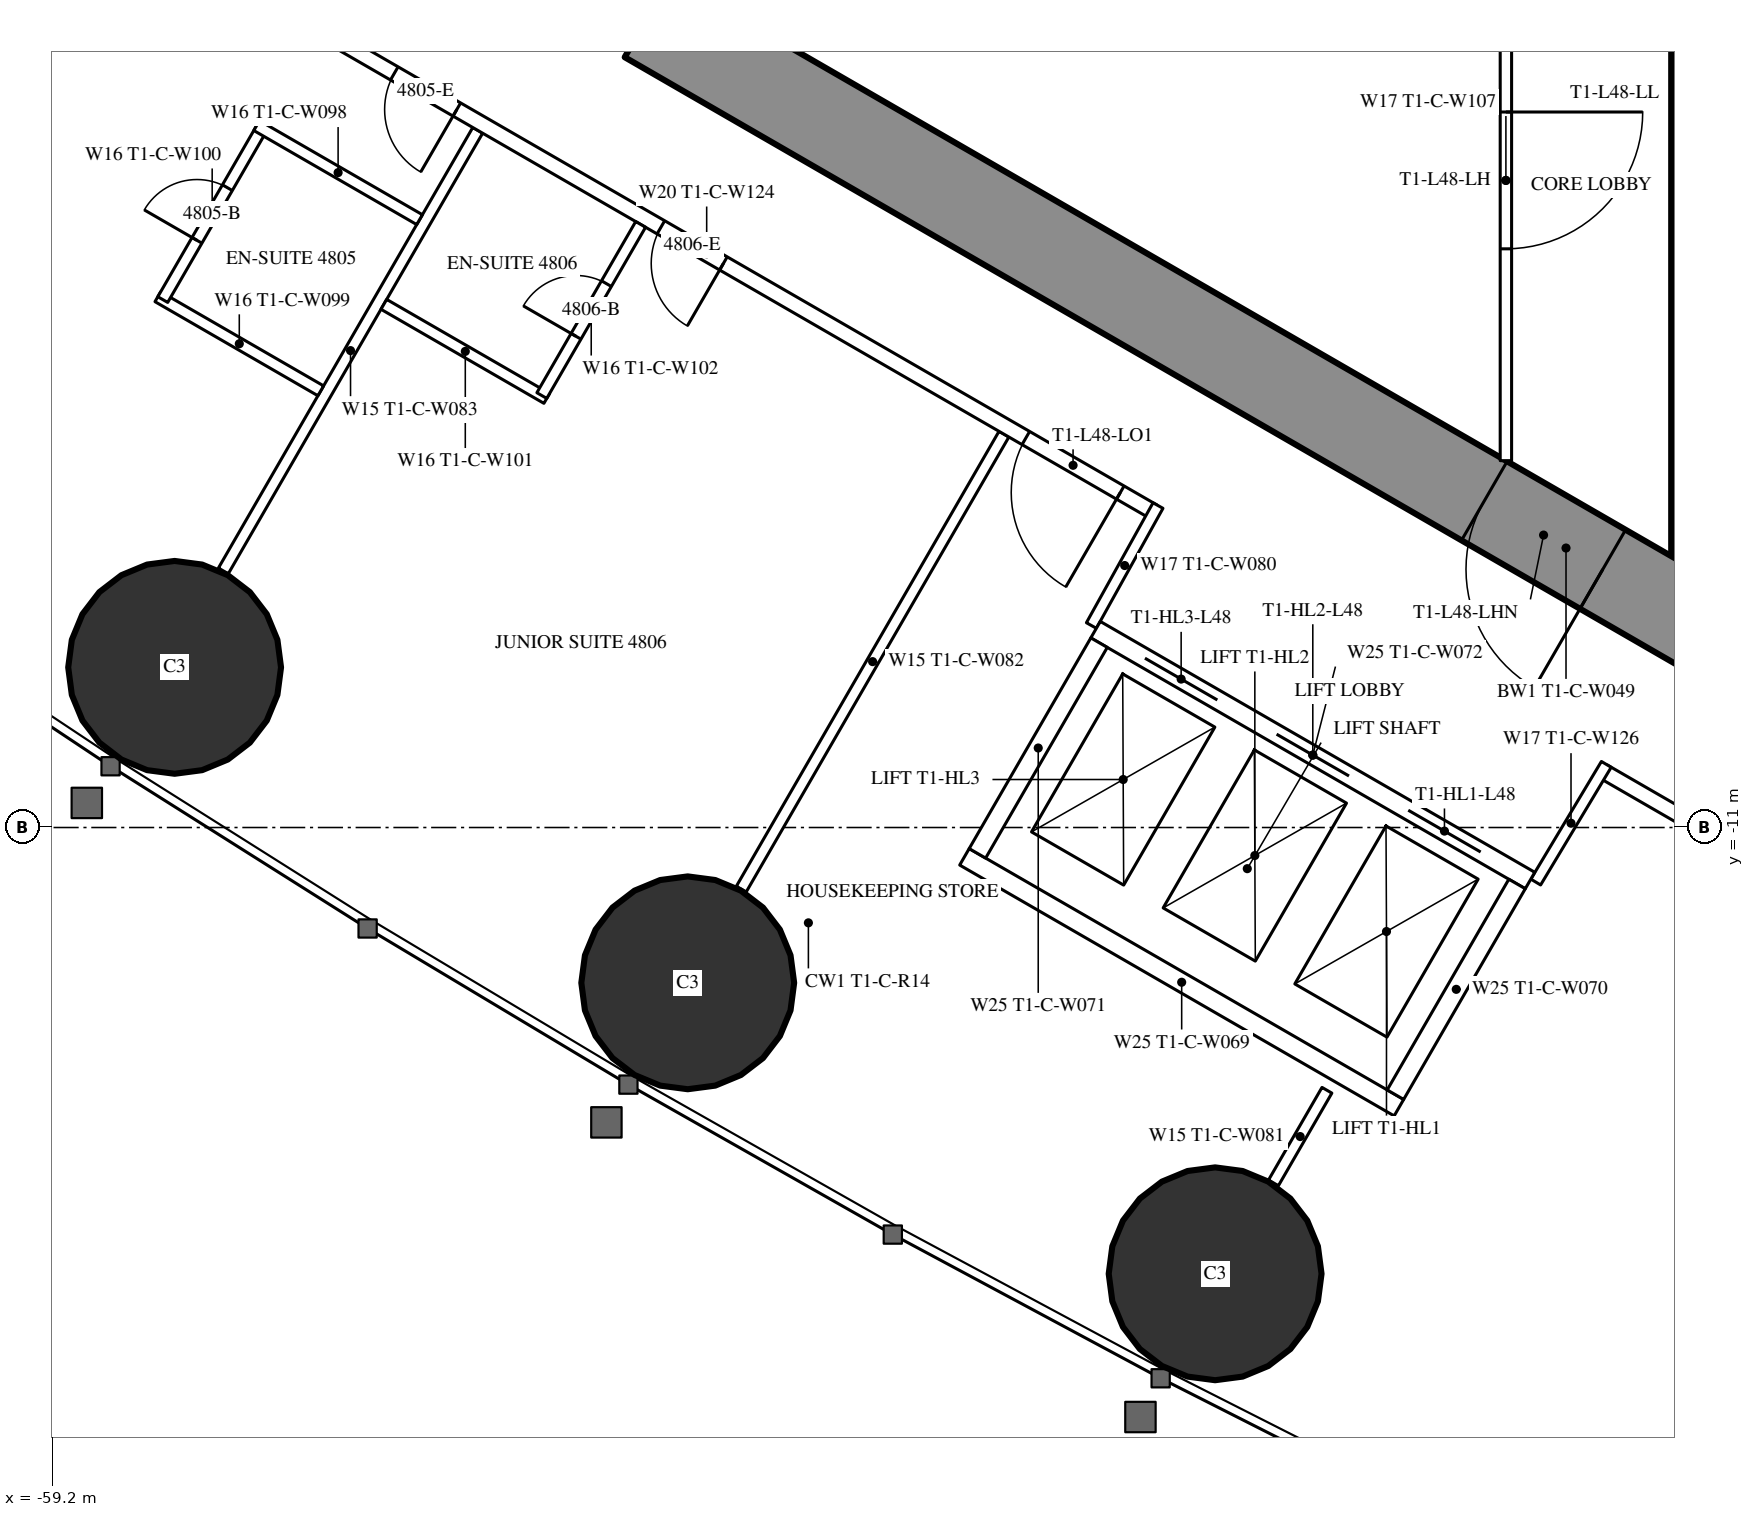
"""IFC4 building model, lengths in metres.
Left out: names, types, materials, properties, quantities, classifications, styles, units other than length and angle.
Written with IfcOpenShell. Run it as: python <this file> out.ifc"""

import sys

from ifc_helpers import new_model, si_unit, direction, frame, frame_2d, origin, origin_2d, place, context, subcontext, project, spatial, rectangle, circle, extrude, element, fill, save


model = new_model("IFC4")
c1 = context("Model", 3, precision=1e-05, world=origin(), true_north=direction((0.0, 1.0)))
c2 = subcontext(c1, "Body", "Model", "MODEL_VIEW")
j1 = project(units=[si_unit("LENGTHUNIT", "METRE"), si_unit("PLANEANGLEUNIT", "RADIAN")], contexts=[c1])
p1 = place(None, origin())
s1 = spatial("IfcSite", under=j1, at=p1, CompositionType="ELEMENT")
p2 = place(p1, origin())
s2 = spatial("IfcBuilding", under=s1, at=p2, CompositionType="ELEMENT")
p3 = place(p2, frame((0.0, 0.0, 180.8)))
s3 = spatial("IfcBuildingStorey", under=s2, at=p3, CompositionType="ELEMENT", Elevation=180.8)
for number, where, z_axis, x_axis in (
    (1, (-57.59, -8.893, 0.0), (0.0, 0.0, 1.0), (1.0, 0.0, 0.0)),
    (2, (-50.839, -13.043, 0.0), (0.0, 0.0, 1.0), (1.0, 0.0, 0.0)),
    (3, (-43.9, -16.871, 0.0), (0.0, 0.0, 1.0), (1.0, 0.0, 0.0)),
):
    element("IfcColumn", number, at=place(p3, frame(where, z_axis=z_axis, x_axis=x_axis)), inside=s3, PredefinedType="COLUMN", context=c2, shape_type="SweptSolid", body=[
        extrude(circle(Radius=1.4, at=origin_2d()), origin(), (0.0, 0.0, 1.0), 3.5),
    ])
p4 = place(p3, frame((-37.3, 8.6, 0.0), z_axis=(0.0, 0.0, 1.0), x_axis=(0.0, -1.0, 0.0)))
e4 = element("IfcWall", 4, at=p4, inside=s3, PredefinedType="SHEAR", context=c2, shape_type="SweptSolid", body=[
    extrude(rectangle(XDim=17.2, YDim=1.2, at=frame_2d((8.6, 0.0))), origin(), (0.0, 0.0, 1.0), 3.5),
])
p5 = place(p4, frame((7.7, 0.0, 0.0)))
e5 = element("IfcOpeningElement", 5, at=p5, cuts=e4, PredefinedType="OPENING", context=c2, shape_type="SweptSolid", body=[
    extrude(rectangle(XDim=1.8, YDim=2.2, at=frame_2d((0.9, 1.1))), frame((0.0, 0.61, 0.0), z_axis=(0.0, -1.0, 0.0), x_axis=(1.0, 0.0, 0.0)), (0.0, 0.0, 1.0), 1.22),
])
p6 = place(p3, frame((-27.2, -14.3, 0.0), z_axis=(0.0, 0.0, 1.0), x_axis=(-0.866024021859, 0.500002393557, 0.0)))
e6 = element("IfcWall", 6, at=p6, inside=s3, PredefinedType="SHEAR", context=c2, shape_type="SweptSolid", body=[
    extrude(rectangle(XDim=27.907, YDim=1.2, at=frame_2d((13.954, 0.0))), origin(), (0.0, 0.0, 1.0), 3.5),
])
p7 = place(p6, frame((4.6, 0.0, 0.0)))
e7 = element("IfcOpeningElement", 7, at=p7, cuts=e6, PredefinedType="OPENING", context=c2, shape_type="SweptSolid", body=[
    extrude(rectangle(XDim=1.0, YDim=2.2, at=frame_2d((0.5, 1.1))), frame((0.0, 0.61, 0.0), z_axis=(0.0, -1.0, 0.0), x_axis=(1.0, 0.0, 0.0)), (0.0, 0.0, 1.0), 1.22),
])
p8 = place(p6, frame((13.395, 0.0, 0.0)))
e8 = element("IfcOpeningElement", 8, at=p8, cuts=e6, PredefinedType="OPENING", context=c2, shape_type="SweptSolid", body=[
    extrude(rectangle(XDim=1.8, YDim=2.2, at=frame_2d((0.9, 1.1))), frame((0.0, 0.61, 0.0), z_axis=(0.0, -1.0, 0.0), x_axis=(1.0, 0.0, 0.0)), (0.0, 0.0, 1.0), 1.22),
])
p9 = place(p3, frame((-46.679, -5.825, 0.0), z_axis=(0.0, 0.0, 1.0), x_axis=(-0.500006839597, -0.866021454905, 0.0)))
e9 = element("IfcWall", 9, at=p9, inside=s3, PredefinedType="PARTITIONING", context=c2, shape_type="SweptSolid", body=[
    extrude(rectangle(XDim=6.911, YDim=0.15, at=frame_2d((3.456, 0.0))), origin(), (0.0, 0.0, 1.0), 2.3),
])
p10 = place(p3, frame((-53.602, -1.828, 0.0), z_axis=(0.0, 0.0, 1.0), x_axis=(-0.49999191814, -0.866030069798, 0.0)))
e10 = element("IfcWall", 10, at=p10, inside=s3, PredefinedType="PARTITIONING", context=c2, shape_type="SweptSolid", body=[
    extrude(rectangle(XDim=6.692, YDim=0.15, at=frame_2d((3.346, 0.0))), origin(), (0.0, 0.0, 1.0), 2.3),
])
p11 = place(p3, frame((-42.429, -14.457, 0.0), z_axis=(0.0, 0.0, 1.0), x_axis=(-0.5000578829, -0.865991982497, 0.0)))
e11 = element("IfcWall", 11, at=p11, inside=s3, PredefinedType="PARTITIONING", context=c2, shape_type="SweptSolid", body=[
    extrude(rectangle(XDim=1.407, YDim=0.15, at=frame_2d((0.704, 0.0))), origin(), (0.0, 0.0, 1.0), 3.25),
])
p12 = place(p3, frame((-27.86, -16.575, 0.0), z_axis=(0.0, 0.0, 1.0), x_axis=(-0.866027756871, 0.499995924312, 0.0)))
e12 = element("IfcWall", 12, at=p12, inside=s3, PredefinedType="PARTITIONING", context=c2, shape_type="SweptSolid", body=[
    extrude(rectangle(XDim=12.622, YDim=0.2, at=frame_2d((6.311, 0.0))), origin(), (0.0, 0.0, 1.0), 3.25),
])
p13 = place(p12, frame((3.75, 0.0, 0.0)))
e13 = element("IfcOpeningElement", 13, at=p13, cuts=e12, PredefinedType="OPENING", context=c2, shape_type="SweptSolid", body=[
    extrude(rectangle(XDim=0.95, YDim=2.2, at=frame_2d((0.475, 1.1))), frame((0.0, 0.11, 0.0), z_axis=(0.0, -1.0, 0.0), x_axis=(1.0, 0.0, 0.0)), (0.0, 0.0, 1.0), 0.22),
])
p14 = place(p3, frame((-44.715, -6.844, 0.0), z_axis=(0.0, 0.0, 1.0), x_axis=(-0.866025261224, 0.500000246922, 0.0)))
e14 = element("IfcWall", 14, at=p14, inside=s3, PredefinedType="PARTITIONING", context=c2, shape_type="SweptSolid", body=[
    extrude(rectangle(XDim=13.567, YDim=0.2, at=frame_2d((6.783, 0.0))), origin(), (0.0, 0.0, 1.0), 3.25),
])
p15 = place(p14, frame((10.579, 0.0, 0.0)))
e15 = element("IfcOpeningElement", 15, at=p15, cuts=e14, PredefinedType="OPENING", context=c2, shape_type="SweptSolid", body=[
    extrude(rectangle(XDim=0.95, YDim=2.2, at=frame_2d((0.475, 1.1))), frame((0.0, 0.11, 0.0), z_axis=(0.0, -1.0, 0.0), x_axis=(1.0, 0.0, 0.0)), (0.0, 0.0, 1.0), 0.22),
])
p16 = place(p14, frame((6.529, 0.0, 0.0)))
e16 = element("IfcOpeningElement", 16, at=p16, cuts=e14, PredefinedType="OPENING", context=c2, shape_type="SweptSolid", body=[
    extrude(rectangle(XDim=0.95, YDim=2.2, at=frame_2d((0.475, 1.1))), frame((0.0, 0.11, 0.0), z_axis=(0.0, -1.0, 0.0), x_axis=(1.0, 0.0, 0.0)), (0.0, 0.0, 1.0), 0.22),
])
p17 = place(p14, frame((0.5, 0.0, 0.0)))
e17 = element("IfcOpeningElement", 17, at=p17, cuts=e14, PredefinedType="OPENING", context=c2, shape_type="SweptSolid", body=[
    extrude(rectangle(XDim=1.435, YDim=2.2, at=frame_2d((0.718, 1.1))), frame((0.0, 0.11, 0.0), z_axis=(0.0, -1.0, 0.0), x_axis=(1.0, 0.0, 0.0)), (0.0, 0.0, 1.0), 0.22),
])
for number, where, z_axis, x_axis in (
    (18, (-39.683, -11.718, 0.0), (0.0, 0.0, 1.0), (0.514, 0.858, 0.0)),
    (19, (-44.652, -6.764, 0.0), (0.0, 0.0, 1.0), (-0.485, -0.874, 0.0)),
):
    element("IfcWall", number, at=place(p3, frame(where, z_axis=z_axis, x_axis=x_axis)), inside=s3, PredefinedType="PARTITIONING", context=c2, shape_type="SweptSolid", body=[
        extrude(rectangle(XDim=1.805, YDim=0.15, at=frame_2d((0.903, 0.0))), origin(), (0.0, 0.0, 1.0), 3.25),
    ])
p18 = place(p3, frame((-55.667, -5.255, 0.0), z_axis=(0.0, 0.0, 1.0), x_axis=(-0.866006523861, 0.500032699561, 0.0)))
e20 = element("IfcWall", 20, at=p18, inside=s3, PredefinedType="PARTITIONING", context=c2, shape_type="SweptSolid", body=[
    extrude(rectangle(XDim=2.475, YDim=0.15, at=frame_2d((1.237, 0.0))), origin(), (0.0, 0.0, 1.0), 3.25),
])
p19 = place(p3, frame((-56.446, -1.803, 0.0), z_axis=(0.0, 0.0, 1.0), x_axis=(-0.499936506574, -0.866062058628, 0.0)))
e21 = element("IfcWall", 21, at=p19, inside=s3, PredefinedType="PARTITIONING", context=c2, shape_type="SweptSolid", body=[
    extrude(rectangle(XDim=2.6, YDim=0.15, at=frame_2d((1.3, 0.0))), origin(), (0.0, 0.0, 1.0), 3.25),
])
p20 = place(p19, frame((0.9, 0.0, 0.0)))
e22 = element("IfcOpeningElement", 22, at=p20, cuts=e21, PredefinedType="OPENING", context=c2, shape_type="SweptSolid", body=[
    extrude(rectangle(XDim=0.8, YDim=2.2, at=frame_2d((0.4, 1.1))), frame((0.0, 0.085, 0.0), z_axis=(0.0, -1.0, 0.0), x_axis=(1.0, 0.0, 0.0)), (0.0, 0.0, 1.0), 0.17),
])
for number, where, z_axis, x_axis in (
    (23, (-54.367, -3.003, 0.0), (0.0, 0.0, 1.0), (-0.866, 0.5, 0.0)),
    (24, (-52.694, -5.355, 0.0), (0.0, 0.0, 1.0), (-0.866, 0.5, 0.0)),
):
    element("IfcWall", number, at=place(p3, frame(where, z_axis=z_axis, x_axis=x_axis)), inside=s3, PredefinedType="PARTITIONING", context=c2, shape_type="SweptSolid", body=[
        extrude(rectangle(XDim=2.475, YDim=0.15, at=frame_2d((1.238, 0.0))), origin(), (0.0, 0.0, 1.0), 3.25),
    ])
p21 = place(p3, frame((-51.459, -3.065, 0.0), z_axis=(0.0, 0.0, 1.0), x_axis=(-0.499936506574, -0.866062058628, 0.0)))
e25 = element("IfcWall", 25, at=p21, inside=s3, PredefinedType="PARTITIONING", context=c2, shape_type="SweptSolid", body=[
    extrude(rectangle(XDim=2.6, YDim=0.15, at=frame_2d((1.3, 0.0))), origin(), (0.0, 0.0, 1.0), 3.25),
])
p22 = place(p21, frame((0.9, 0.0, 0.0)))
e26 = element("IfcOpeningElement", 26, at=p22, cuts=e25, PredefinedType="OPENING", context=c2, shape_type="SweptSolid", body=[
    extrude(rectangle(XDim=0.8, YDim=2.2, at=frame_2d((0.4, 1.1))), frame((0.0, 0.085, 0.0), z_axis=(0.0, -1.0, 0.0), x_axis=(1.0, 0.0, 0.0)), (0.0, 0.0, 1.0), 0.17),
])
p23 = place(p3, frame((-40.075, 1.2, 0.0), z_axis=(0.0, 0.0, 1.0), x_axis=(0.0, -1.0, 0.0)))
e27 = element("IfcWall", 27, at=p23, inside=s3, PredefinedType="PARTITIONING", context=c2, shape_type="SweptSolid", body=[
    extrude(rectangle(XDim=7.374, YDim=0.15, at=frame_2d((3.687, 0.0))), origin(), (0.0, 0.0, 1.0), 3.25),
])
p24 = place(p23, frame((2.787, 0.0, 0.0)))
e28 = element("IfcOpeningElement", 28, at=p24, cuts=e27, PredefinedType="OPENING", context=c2, shape_type="SweptSolid", body=[
    extrude(rectangle(XDim=1.8, YDim=2.2, at=frame_2d((0.9, 1.1))), frame((0.0, 0.085, 0.0), z_axis=(0.0, -1.0, 0.0), x_axis=(1.0, 0.0, 0.0)), (0.0, 0.0, 1.0), 0.17),
])
p25 = place(p3, frame((-39.758, -11.697, 0.0), z_axis=(0.0, 0.0, 1.0), x_axis=(-0.866024194504, 0.500002094529, 0.0)))
e29 = element("IfcWall", 29, at=p25, inside=s3, PredefinedType="PARTITIONING", context=c2, shape_type="SweptSolid", body=[
    extrude(rectangle(XDim=6.6, YDim=0.25, at=frame_2d((3.3, 0.0))), origin(), (0.0, 0.0, 1.0), 3.25),
])
p26 = place(p25, frame((0.75, 0.0, 0.0)))
e30 = element("IfcOpeningElement", 30, at=p26, cuts=e29, PredefinedType="OPENING", context=c2, shape_type="SweptSolid", body=[
    extrude(rectangle(XDim=1.1, YDim=2.2, at=frame_2d((0.55, 1.1))), frame((0.0, 0.135, 0.0), z_axis=(0.0, -1.0, 0.0), x_axis=(1.0, 0.0, 0.0)), (0.0, 0.0, 1.0), 0.27),
])
p27 = place(p25, frame((2.75, 0.0, 0.0)))
e31 = element("IfcOpeningElement", 31, at=p27, cuts=e29, PredefinedType="OPENING", context=c2, shape_type="SweptSolid", body=[
    extrude(rectangle(XDim=1.1, YDim=2.2, at=frame_2d((0.55, 1.1))), frame((0.0, 0.135, 0.0), z_axis=(0.0, -1.0, 0.0), x_axis=(1.0, 0.0, 0.0)), (0.0, 0.0, 1.0), 0.27),
])
p28 = place(p25, frame((4.75, 0.0, 0.0)))
e32 = element("IfcOpeningElement", 32, at=p28, cuts=e29, PredefinedType="OPENING", context=c2, shape_type="SweptSolid", body=[
    extrude(rectangle(XDim=1.1, YDim=2.2, at=frame_2d((0.55, 1.1))), frame((0.0, 0.135, 0.0), z_axis=(0.0, -1.0, 0.0), x_axis=(1.0, 0.0, 0.0)), (0.0, 0.0, 1.0), 0.27),
])
p29 = place(p3, frame((-41.482, -14.686, 0.0), z_axis=(0.0, 0.0, 1.0), x_axis=(-0.86603344179, 0.499986077507, 0.0)))
e33 = element("IfcWall", 33, at=p29, inside=s3, PredefinedType="PARTITIONING", context=c2, shape_type="SweptSolid", body=[
    extrude(rectangle(XDim=6.6, YDim=0.25, at=frame_2d((3.3, 0.0))), origin(), (0.0, 0.0, 1.0), 3.25),
])
for number, where, z_axis, x_axis in (
    (34, (-39.928, -11.743, 0.0), (0.0, 0.0, 1.0), (-0.5, -0.866, 0.0)),
    (35, (-45.428, -8.568, 0.0), (0.0, 0.0, 1.0), (-0.5, -0.866, 0.0)),
):
    element("IfcWall", number, at=place(p3, frame(where, z_axis=z_axis, x_axis=x_axis)), inside=s3, PredefinedType="PARTITIONING", context=c2, shape_type="SweptSolid", body=[
        extrude(rectangle(XDim=3.201, YDim=0.25, at=frame_2d((1.6, 0.0))), origin(), (0.0, 0.0, 1.0), 3.25),
    ])
p30 = place(p20, origin())
e36 = element("IfcDoor", 36, at=p30, inside=s3, OperationType="SINGLE_SWING_RIGHT", PredefinedType="DOOR", context=c2, shape_type="SweptSolid", body=[
    extrude(rectangle(XDim=0.8, YDim=2.2, at=frame_2d((0.4, 1.1))), frame((0.0, 0.025, 0.0), z_axis=(0.0, -1.0, 0.0), x_axis=(1.0, 0.0, 0.0)), (0.0, 0.0, 1.0), 0.05),
])
fill(e22, e36)
p31 = place(p15, origin())
e37 = element("IfcDoor", 37, at=p31, inside=s3, OperationType="SINGLE_SWING_LEFT", PredefinedType="DOOR", context=c2, shape_type="SweptSolid", body=[
    extrude(rectangle(XDim=0.95, YDim=2.2, at=frame_2d((0.475, 1.1))), frame((0.0, 0.025, 0.0), z_axis=(0.0, -1.0, 0.0), x_axis=(1.0, 0.0, 0.0)), (0.0, 0.0, 1.0), 0.05),
])
fill(e15, e37)
p32 = place(p22, origin())
e38 = element("IfcDoor", 38, at=p32, inside=s3, OperationType="SINGLE_SWING_RIGHT", PredefinedType="DOOR", context=c2, shape_type="SweptSolid", body=[
    extrude(rectangle(XDim=0.8, YDim=2.2, at=frame_2d((0.4, 1.1))), frame((0.0, 0.025, 0.0), z_axis=(0.0, -1.0, 0.0), x_axis=(1.0, 0.0, 0.0)), (0.0, 0.0, 1.0), 0.05),
])
fill(e26, e38)
p33 = place(p16, origin())
e39 = element("IfcDoor", 39, at=p33, inside=s3, OperationType="SINGLE_SWING_LEFT", PredefinedType="DOOR", context=c2, shape_type="SweptSolid", body=[
    extrude(rectangle(XDim=0.95, YDim=2.2, at=frame_2d((0.475, 1.1))), frame((0.0, 0.025, 0.0), z_axis=(0.0, -1.0, 0.0), x_axis=(1.0, 0.0, 0.0)), (0.0, 0.0, 1.0), 0.05),
])
fill(e16, e39)
p34 = place(p17, origin())
e40 = element("IfcDoor", 40, at=p34, inside=s3, OperationType="SINGLE_SWING_LEFT", PredefinedType="DOOR", context=c2, shape_type="SweptSolid", body=[
    extrude(rectangle(XDim=1.435, YDim=2.2, at=frame_2d((0.718, 1.1))), frame((0.0, 0.025, 0.0), z_axis=(0.0, -1.0, 0.0), x_axis=(1.0, 0.0, 0.0)), (0.0, 0.0, 1.0), 0.05),
])
fill(e17, e40)
p35 = place(p24, origin())
e41 = element("IfcDoor", 41, at=p35, inside=s3, OperationType="DOUBLE_DOOR_SINGLE_SWING", PredefinedType="DOOR", context=c2, shape_type="SweptSolid", body=[
    extrude(rectangle(XDim=1.8, YDim=2.2, at=frame_2d((0.9, 1.1))), frame((0.0, 0.025, 0.0), z_axis=(0.0, -1.0, 0.0), x_axis=(1.0, 0.0, 0.0)), (0.0, 0.0, 1.0), 0.05),
])
fill(e28, e41)
p36 = place(p8, origin())
e42 = element("IfcDoor", 42, at=p36, inside=s3, OperationType="DOUBLE_DOOR_SINGLE_SWING", PredefinedType="DOOR", context=c2, shape_type="SweptSolid", body=[
    extrude(rectangle(XDim=1.8, YDim=2.2, at=frame_2d((0.9, 1.1))), frame((0.0, 0.025, 0.0), z_axis=(0.0, -1.0, 0.0), x_axis=(1.0, 0.0, 0.0)), (0.0, 0.0, 1.0), 0.05),
])
fill(e8, e42)
p37 = place(p26, origin())
e43 = element("IfcDoor", 43, at=p37, inside=s3, OperationType="DOUBLE_DOOR_SLIDING", PredefinedType="USERDEFINED", context=c2, shape_type="SweptSolid", body=[
    extrude(rectangle(XDim=1.1, YDim=2.2, at=frame_2d((0.55, 1.1))), frame((0.0, 0.025, 0.0), z_axis=(0.0, -1.0, 0.0), x_axis=(1.0, 0.0, 0.0)), (0.0, 0.0, 1.0), 0.05),
])
fill(e30, e43)
p38 = place(p27, origin())
e44 = element("IfcDoor", 44, at=p38, inside=s3, OperationType="DOUBLE_DOOR_SLIDING", PredefinedType="USERDEFINED", context=c2, shape_type="SweptSolid", body=[
    extrude(rectangle(XDim=1.1, YDim=2.2, at=frame_2d((0.55, 1.1))), frame((0.0, 0.025, 0.0), z_axis=(0.0, -1.0, 0.0), x_axis=(1.0, 0.0, 0.0)), (0.0, 0.0, 1.0), 0.05),
])
fill(e31, e44)
p39 = place(p28, origin())
e45 = element("IfcDoor", 45, at=p39, inside=s3, OperationType="DOUBLE_DOOR_SLIDING", PredefinedType="USERDEFINED", context=c2, shape_type="SweptSolid", body=[
    extrude(rectangle(XDim=1.1, YDim=2.2, at=frame_2d((0.55, 1.1))), frame((0.0, 0.025, 0.0), z_axis=(0.0, -1.0, 0.0), x_axis=(1.0, 0.0, 0.0)), (0.0, 0.0, 1.0), 0.05),
])
fill(e32, e45)
save(model, sys.argv[1])
